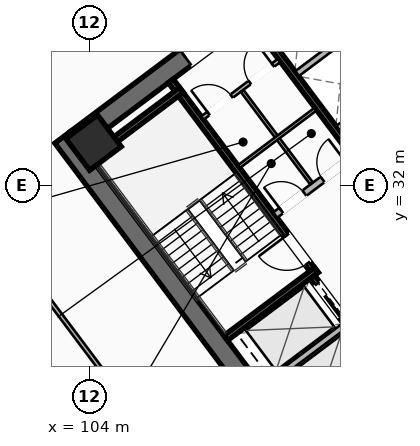
"""IFC4 building model, lengths in metres.
Left out: names, types, materials, properties, quantities, classifications, styles, units other than length and angle.
Written with IfcOpenShell. Run it as: python <this file> out.ifc"""

import sys

from ifc_helpers import new_model, si_unit, direction, frame, frame_2d, origin, origin_2d, place, context, subcontext, project, spatial, rectangle, hollow_rectangle, extrude, element, fill, save


model = new_model("IFC4")
c1 = context("Model", 3, precision=1e-05, world=origin(), true_north=direction((0.0, 1.0)))
c2 = subcontext(c1, "Body", "Model", "MODEL_VIEW")
j1 = project(units=[si_unit("LENGTHUNIT", "METRE"), si_unit("PLANEANGLEUNIT", "RADIAN")], contexts=[c1])
p1 = place(None, origin())
s1 = spatial("IfcSite", under=j1, at=p1, CompositionType="ELEMENT")
p2 = place(p1, origin())
s2 = spatial("IfcBuilding", under=s1, at=p2, CompositionType="ELEMENT")
p3 = place(p2, frame((0.0, 0.0, 60.1)))
s3 = spatial("IfcBuildingStorey", under=s2, at=p3, CompositionType="ELEMENT", Elevation=60.1)
p4 = place(p3, frame((112.476, 21.107, 0.0), z_axis=(0.0, 0.0, 1.0), x_axis=(-0.600005007985, 0.799996243986, 0.0)))
e1 = element("IfcWall", 1, at=p4, inside=s3, PredefinedType="SHEAR", context=c2, shape_type="SweptSolid", body=[
    extrude(rectangle(XDim=15.6, YDim=0.65, at=frame_2d((7.8, 0.0))), origin(), (0.0, 0.0, 1.0), 3.55),
])
p5 = place(p3, frame((103.571, 33.522, 0.0), z_axis=(0.0, 0.0, 1.0), x_axis=(0.799998028465, 0.600002628705, 0.0)))
e2 = element("IfcWall", 2, at=p5, inside=s3, PredefinedType="SHEAR", context=c2, shape_type="SweptSolid", body=[
    extrude(rectangle(XDim=14.86, YDim=0.65, at=frame_2d((7.43, 0.0))), origin(), (0.0, 0.0, 1.0), 3.55),
])
p6 = place(p5, frame((4.48, 0.0, 0.0)))
e3 = element("IfcOpeningElement", 3, at=p6, cuts=e2, PredefinedType="OPENING", context=c2, shape_type="SweptSolid", body=[
    extrude(rectangle(XDim=1.25, YDim=2.25, at=frame_2d((0.625, 1.125))), frame((0.0, 0.335, 0.0), z_axis=(0.0, -1.0, 0.0), x_axis=(1.0, 0.0, 0.0)), (0.0, 0.0, 1.0), 0.67),
])
p7 = place(p5, frame((9.53, 0.0, 0.0)))
e4 = element("IfcOpeningElement", 4, at=p7, cuts=e2, PredefinedType="OPENING", context=c2, shape_type="SweptSolid", body=[
    extrude(rectangle(XDim=1.25, YDim=2.25, at=frame_2d((0.625, 1.125))), frame((0.0, 0.335, 0.0), z_axis=(0.0, -1.0, 0.0), x_axis=(1.0, 0.0, 0.0)), (0.0, 0.0, 1.0), 0.67),
])
p8 = place(p3, frame((104.13, 33.41, 0.0), z_axis=(0.0, 0.0, 1.0), x_axis=(0.799999996291, 0.600000004945, 0.0)))
e5 = element("IfcColumn", 5, at=p8, inside=s3, PredefinedType="COLUMN", context=c2, shape_type="SweptSolid", body=[
    extrude(hollow_rectangle(XDim=1.3, YDim=1.3, WallThickness=0.05, at=origin_2d()), origin(), (0.0, 0.0, 1.0), 3.35),
])
p9 = place(p3, frame((111.44, 29.08, 0.0), z_axis=(0.0, 0.0, 1.0), x_axis=(-0.600009827119, 0.799992629566, 0.0)))
e6 = element("IfcWall", 6, at=p9, inside=s3, PredefinedType="SHEAR", context=c2, shape_type="SweptSolid", body=[
    extrude(rectangle(XDim=7.95, YDim=0.2, at=frame_2d((3.975, 0.0))), origin(), (0.0, 0.0, 1.0), 3.35),
])
p10 = place(p9, frame((0.45, 0.0, 0.0)))
e7 = element("IfcOpeningElement", 7, at=p10, cuts=e6, PredefinedType="OPENING", context=c2, shape_type="SweptSolid", body=[
    extrude(rectangle(XDim=1.15, YDim=2.2, at=frame_2d((0.575, 1.1))), frame((0.0, 0.11, 0.0), z_axis=(0.0, -1.0, 0.0), x_axis=(1.0, 0.0, 0.0)), (0.0, 0.0, 1.0), 0.22),
])
for number, where, z_axis, x_axis in (
    (8, (108.476, 26.982, 0.0), (0.0, 0.0, 1.0), (0.8, 0.6, 0.0)),
    (9, (104.036, 32.902, 0.0), (0.0, 0.0, 1.0), (0.8, 0.6, 0.0)),
):
    element("IfcWall", number, at=place(p3, frame(where, z_axis=z_axis, x_axis=x_axis)), inside=s3, PredefinedType="SHEAR", context=c2, shape_type="SweptSolid", body=[
        extrude(rectangle(XDim=3.73, YDim=0.2, at=frame_2d((1.865, 0.0))), origin(), (0.0, 0.0, 1.0), 3.35),
    ])
p11 = place(p3, frame((117.938, 26.016, 0.0), z_axis=(0.0, 0.0, 1.0), x_axis=(-0.600005463273, 0.799995902516, 0.0)))
e10 = element("IfcWall", 10, at=p11, inside=s3, PredefinedType="SHEAR", context=c2, shape_type="SweptSolid", body=[
    extrude(rectangle(XDim=14.3, YDim=0.2, at=frame_2d((7.15, 0.0))), origin(), (0.0, 0.0, 1.0), 3.35),
])
p12 = place(p3, frame((110.104, 31.028, 0.0), z_axis=(0.0, 0.0, 1.0), x_axis=(0.800018601094, 0.59997519774, 0.0)))
e11 = element("IfcWall", 11, at=p12, inside=s3, PredefinedType="SOLIDWALL", context=c2, shape_type="SweptSolid", body=[
    extrude(rectangle(XDim=3.15, YDim=0.22, at=frame_2d((1.575, 0.0))), origin(), (0.0, 0.0, 1.0), 2.703),
])
p13 = place(p12, frame((0.25, 0.0, 0.0)))
e12 = element("IfcOpeningElement", 12, at=p13, cuts=e11, PredefinedType="OPENING", context=c2, shape_type="SweptSolid", body=[
    extrude(rectangle(XDim=0.95, YDim=2.05, at=frame_2d((0.475, 1.025))), frame((0.0, 0.12, 0.0), z_axis=(0.0, -1.0, 0.0), x_axis=(1.0, 0.0, 0.0)), (0.0, 0.0, 1.0), 0.24),
])
p14 = place(p12, frame((1.95, 0.0, 0.0)))
e13 = element("IfcOpeningElement", 13, at=p14, cuts=e11, PredefinedType="OPENING", context=c2, shape_type="SweptSolid", body=[
    extrude(rectangle(XDim=0.95, YDim=2.05, at=frame_2d((0.475, 1.025))), frame((0.0, 0.12, 0.0), z_axis=(0.0, -1.0, 0.0), x_axis=(1.0, 0.0, 0.0)), (0.0, 0.0, 1.0), 0.24),
])
p15 = place(p3, frame((115.13, 23.91, 0.0), z_axis=(0.0, 0.0, 1.0), x_axis=(-0.599975393228, 0.800018454488, 0.0)))
e14 = element("IfcWall", 14, at=p15, inside=s3, PredefinedType="SHEAR", context=c2, shape_type="SweptSolid", body=[
    extrude(rectangle(XDim=6.35, YDim=0.2, at=frame_2d((3.175, 0.0))), origin(), (0.0, 0.0, 1.0), 3.35),
])
p16 = place(p15, frame((4.775, 0.0, 0.0)))
e15 = element("IfcOpeningElement", 15, at=p16, cuts=e14, PredefinedType="OPENING", context=c2, shape_type="SweptSolid", body=[
    extrude(rectangle(XDim=1.3, YDim=2.25, at=frame_2d((0.65, 1.125))), frame((0.0, 0.11, 0.0), z_axis=(0.0, -1.0, 0.0), x_axis=(1.0, 0.0, 0.0)), (0.0, 0.0, 1.0), 0.22),
])
p17 = place(p15, frame((2.775, 0.0, 0.0)))
e16 = element("IfcOpeningElement", 16, at=p17, cuts=e14, PredefinedType="OPENING", context=c2, shape_type="SweptSolid", body=[
    extrude(rectangle(XDim=1.3, YDim=2.25, at=frame_2d((0.65, 1.125))), frame((0.0, 0.11, 0.0), z_axis=(0.0, -1.0, 0.0), x_axis=(1.0, 0.0, 0.0)), (0.0, 0.0, 1.0), 0.22),
])
p18 = place(p15, frame((0.575, 0.0, 0.0)))
e17 = element("IfcOpeningElement", 17, at=p18, cuts=e14, PredefinedType="OPENING", context=c2, shape_type="SweptSolid", body=[
    extrude(rectangle(XDim=1.3, YDim=2.25, at=frame_2d((0.65, 1.125))), frame((0.0, 0.11, 0.0), z_axis=(0.0, -1.0, 0.0), x_axis=(1.0, 0.0, 0.0)), (0.0, 0.0, 1.0), 0.22),
])
p19 = place(p3, frame((109.688, 25.366, 0.0), z_axis=(0.0, 0.0, 1.0), x_axis=(0.8, 0.6, 0.0)))
e18 = element("IfcWall", 18, at=p19, inside=s3, PredefinedType="SOLIDWALL", context=c2, shape_type="SweptSolid", body=[
    extrude(rectangle(XDim=3.38, YDim=0.2, at=frame_2d((1.69, 0.0))), origin(), (0.0, 0.0, 1.0), 3.35),
])
p20 = place(p3, frame((107.71, 34.22, 0.0), z_axis=(0.0, 0.0, 1.0), x_axis=(0.799981399002, 0.60002480053, 0.0)))
e19 = element("IfcWall", 19, at=p20, inside=s3, PredefinedType="PARTITIONING", context=c2, shape_type="SweptSolid", body=[
    extrude(rectangle(XDim=3.15, YDim=0.135, at=frame_2d((1.575, 0.0))), origin(), (0.0, 0.0, 1.0), 2.703),
])
p21 = place(p20, frame((0.25, 0.0, 0.0)))
e20 = element("IfcOpeningElement", 20, at=p21, cuts=e19, PredefinedType="OPENING", context=c2, shape_type="SweptSolid", body=[
    extrude(rectangle(XDim=0.95, YDim=2.05, at=frame_2d((0.475, 1.025))), frame((0.0, 0.077, 0.0), z_axis=(0.0, -1.0, 0.0), x_axis=(1.0, 0.0, 0.0)), (0.0, 0.0, 1.0), 0.155),
])
p22 = place(p20, frame((1.95, 0.0, 0.0)))
e21 = element("IfcOpeningElement", 21, at=p22, cuts=e19, PredefinedType="OPENING", context=c2, shape_type="SweptSolid", body=[
    extrude(rectangle(XDim=0.95, YDim=2.05, at=frame_2d((0.475, 1.025))), frame((0.0, 0.077, 0.0), z_axis=(0.0, -1.0, 0.0), x_axis=(1.0, 0.0, 0.0)), (0.0, 0.0, 1.0), 0.155),
])
p23 = place(p3, frame((111.296, 32.072, 0.0), z_axis=(0.0, 0.0, 1.0), x_axis=(-0.59995887973, 0.800030838552, 0.0)))
e22 = element("IfcWall", 22, at=p23, inside=s3, PredefinedType="PARTITIONING", context=c2, shape_type="SweptSolid", body=[
    extrude(rectangle(XDim=3.8, YDim=0.11, at=frame_2d((1.9, 0.0))), origin(), (0.0, 0.0, 1.0), 2.703),
])
p24 = place(p3, frame((108.91, 32.62, 0.0), z_axis=(0.0, 0.0, 1.0), x_axis=(0.800018601094, 0.59997519774, 0.0)))
e23 = element("IfcWall", 23, at=p24, inside=s3, PredefinedType="PARTITIONING", context=c2, shape_type="SweptSolid", body=[
    extrude(rectangle(XDim=3.15, YDim=0.11, at=frame_2d((1.575, 0.0))), origin(), (0.0, 0.0, 1.0), 2.703),
])
p25 = place(p3, frame((115.11, 33.27, 0.0), z_axis=(0.0, 0.0, 1.0), x_axis=(-0.600011488909, 0.79999138319, 0.0)))
e24 = element("IfcWall", 24, at=p25, inside=s3, PredefinedType="SOLIDWALL", context=c2, shape_type="SweptSolid", body=[
    extrude(rectangle(XDim=6.8, YDim=0.2, at=frame_2d((3.4, 0.0))), origin(), (0.0, 0.0, 1.0), 3.35),
])
p26 = place(p3, frame((112.176, 33.882, 0.0), z_axis=(0.0, 0.0, 1.0), x_axis=(0.8, 0.6, 0.0)))
e25 = element("IfcWall", 25, at=p26, inside=s3, PredefinedType="SOLIDWALL", context=c2, shape_type="SweptSolid", body=[
    extrude(rectangle(XDim=1.88, YDim=0.2, at=frame_2d((0.94, 0.0))), origin(), (0.0, 0.0, 1.0), 3.35),
])
p27 = place(p3, frame((110.826, 35.682, 0.0), z_axis=(0.0, 0.0, 1.0), x_axis=(0.799984418148, 0.600020775241, 0.0)))
e26 = element("IfcWall", 26, at=p27, inside=s3, PredefinedType="SOLIDWALL", context=c2, shape_type="SweptSolid", body=[
    extrude(rectangle(XDim=1.88, YDim=0.2, at=frame_2d((0.94, 0.0))), origin(), (0.0, 0.0, 1.0), 3.35),
])
p28 = place(p3, frame((98.396, 33.922, 0.0), z_axis=(0.0, 0.0, 1.0), x_axis=(0.800001954438, 0.599997394074, 0.0)))
e27 = element("IfcWall", 27, at=p28, inside=s3, PredefinedType="PARTITIONING", context=c2, shape_type="SweptSolid", body=[
    extrude(rectangle(XDim=29.98, YDim=0.135, at=frame_2d((14.99, 0.0))), origin(), (0.0, 0.0, 1.0), 2.703),
])
p29 = place(p28, frame((0.3, 0.0, 0.0)))
e28 = element("IfcOpeningElement", 28, at=p29, cuts=e27, PredefinedType="OPENING", context=c2, shape_type="SweptSolid", body=[
    extrude(rectangle(XDim=0.95, YDim=2.05, at=frame_2d((0.475, 1.025))), frame((0.0, 0.077, 0.0), z_axis=(0.0, -1.0, 0.0), x_axis=(1.0, 0.0, 0.0)), (0.0, 0.0, 1.0), 0.155),
])
p30 = place(p28, frame((11.143, 0.0, 0.0)))
e29 = element("IfcOpeningElement", 29, at=p30, cuts=e27, PredefinedType="OPENING", context=c2, shape_type="SweptSolid", body=[
    extrude(rectangle(XDim=0.95, YDim=2.05, at=frame_2d((0.475, 1.025))), frame((0.0, 0.077, 0.0), z_axis=(0.0, -1.0, 0.0), x_axis=(1.0, 0.0, 0.0)), (0.0, 0.0, 1.0), 0.155),
])
p31 = place(p28, frame((28.73, 0.0, 0.0)))
e30 = element("IfcOpeningElement", 30, at=p31, cuts=e27, PredefinedType="OPENING", context=c2, shape_type="SweptSolid", body=[
    extrude(rectangle(XDim=0.95, YDim=2.05, at=frame_2d((0.475, 1.025))), frame((0.0, 0.077, 0.0), z_axis=(0.0, -1.0, 0.0), x_axis=(1.0, 0.0, 0.0)), (0.0, 0.0, 1.0), 0.155),
])
p32 = place(p3, frame((135.46, 34.47, 0.0), z_axis=(0.0, 0.0, 1.0), x_axis=(-0.799998045563, -0.600002605907, 0.0)))
e31 = element("IfcWall", 31, at=p32, inside=s3, PredefinedType="PARTITIONING", context=c2, shape_type="SweptSolid", body=[
    extrude(rectangle(XDim=29.98, YDim=0.135, at=frame_2d((14.99, 0.0))), origin(), (0.0, 0.0, 1.0), 2.703),
])
p33 = place(p32, frame((28.65, 0.0, 0.0)))
e32 = element("IfcOpeningElement", 32, at=p33, cuts=e31, PredefinedType="OPENING", context=c2, shape_type="SweptSolid", body=[
    extrude(rectangle(XDim=0.95, YDim=2.05, at=frame_2d((0.475, 1.025))), frame((0.0, 0.077, 0.0), z_axis=(0.0, -1.0, 0.0), x_axis=(1.0, 0.0, 0.0)), (0.0, 0.0, 1.0), 0.155),
])
p34 = place(p32, frame((17.938, 0.0, 0.0)))
e33 = element("IfcOpeningElement", 33, at=p34, cuts=e31, PredefinedType="OPENING", context=c2, shape_type="SweptSolid", body=[
    extrude(rectangle(XDim=0.95, YDim=2.05, at=frame_2d((0.475, 1.025))), frame((0.0, 0.077, 0.0), z_axis=(0.0, -1.0, 0.0), x_axis=(1.0, 0.0, 0.0)), (0.0, 0.0, 1.0), 0.155),
])
p35 = place(p32, frame((0.38, 0.0, 0.0)))
e34 = element("IfcOpeningElement", 34, at=p35, cuts=e31, PredefinedType="OPENING", context=c2, shape_type="SweptSolid", body=[
    extrude(rectangle(XDim=0.95, YDim=2.05, at=frame_2d((0.475, 1.025))), frame((0.0, 0.077, 0.0), z_axis=(0.0, -1.0, 0.0), x_axis=(1.0, 0.0, 0.0)), (0.0, 0.0, 1.0), 0.155),
])
p36 = place(p3, frame((111.428, 16.546, 0.0), z_axis=(0.0, 0.0, 1.0), x_axis=(-0.599996389772, 0.800002707659, 0.0)))
e35 = element("IfcWall", 35, at=p36, inside=s3, PredefinedType="PARTITIONING", context=c2, shape_type="SweptSolid", body=[
    extrude(rectangle(XDim=21.64, YDim=0.135, at=frame_2d((10.82, 0.0))), origin(), (0.0, 0.0, 1.0), 2.703),
])
p37 = place(p36, frame((0.3, 0.0, 0.0)))
e36 = element("IfcOpeningElement", 36, at=p37, cuts=e35, PredefinedType="OPENING", context=c2, shape_type="SweptSolid", body=[
    extrude(rectangle(XDim=0.95, YDim=2.05, at=frame_2d((0.475, 1.025))), frame((0.0, 0.077, 0.0), z_axis=(0.0, -1.0, 0.0), x_axis=(1.0, 0.0, 0.0)), (0.0, 0.0, 1.0), 0.155),
])
p38 = place(p6, origin())
e37 = element("IfcDoor", 37, at=p38, inside=s3, OperationType="SINGLE_SWING_LEFT", PredefinedType="DOOR", context=c2, shape_type="SweptSolid", body=[
    extrude(rectangle(XDim=1.25, YDim=2.25, at=frame_2d((0.625, 1.125))), frame((0.0, 0.025, 0.0), z_axis=(0.0, -1.0, 0.0), x_axis=(1.0, 0.0, 0.0)), (0.0, 0.0, 1.0), 0.05),
])
fill(e3, e37)
p39 = place(p10, origin())
e38 = element("IfcDoor", 38, at=p39, inside=s3, OperationType="SINGLE_SWING_RIGHT", PredefinedType="DOOR", context=c2, shape_type="SweptSolid", body=[
    extrude(rectangle(XDim=1.15, YDim=2.2, at=frame_2d((0.575, 1.1))), frame((0.0, 0.025, 0.0), z_axis=(0.0, -1.0, 0.0), x_axis=(1.0, 0.0, 0.0)), (0.0, 0.0, 1.0), 0.05),
])
fill(e7, e38)
p40 = place(p21, origin())
e39 = element("IfcDoor", 39, at=p40, inside=s3, OperationType="SINGLE_SWING_LEFT", PredefinedType="DOOR", context=c2, shape_type="SweptSolid", body=[
    extrude(rectangle(XDim=0.95, YDim=2.05, at=frame_2d((0.475, 1.025))), frame((0.0, 0.025, 0.0), z_axis=(0.0, -1.0, 0.0), x_axis=(1.0, 0.0, 0.0)), (0.0, 0.0, 1.0), 0.05),
])
fill(e20, e39)
p41 = place(p22, origin())
e40 = element("IfcDoor", 40, at=p41, inside=s3, OperationType="SINGLE_SWING_RIGHT", PredefinedType="DOOR", context=c2, shape_type="SweptSolid", body=[
    extrude(rectangle(XDim=0.95, YDim=2.05, at=frame_2d((0.475, 1.025))), frame((0.0, 0.025, 0.0), z_axis=(0.0, -1.0, 0.0), x_axis=(1.0, 0.0, 0.0)), (0.0, 0.0, 1.0), 0.05),
])
fill(e21, e40)
p42 = place(p13, origin())
e41 = element("IfcDoor", 41, at=p42, inside=s3, OperationType="SINGLE_SWING_LEFT", PredefinedType="DOOR", context=c2, shape_type="SweptSolid", body=[
    extrude(rectangle(XDim=0.95, YDim=2.05, at=frame_2d((0.475, 1.025))), frame((0.0, 0.025, 0.0), z_axis=(0.0, -1.0, 0.0), x_axis=(1.0, 0.0, 0.0)), (0.0, 0.0, 1.0), 0.05),
])
fill(e12, e41)
p43 = place(p14, origin())
e42 = element("IfcDoor", 42, at=p43, inside=s3, OperationType="SINGLE_SWING_RIGHT", PredefinedType="DOOR", context=c2, shape_type="SweptSolid", body=[
    extrude(rectangle(XDim=0.95, YDim=2.05, at=frame_2d((0.475, 1.025))), frame((0.0, 0.025, 0.0), z_axis=(0.0, -1.0, 0.0), x_axis=(1.0, 0.0, 0.0)), (0.0, 0.0, 1.0), 0.05),
])
fill(e13, e42)
p44 = place(p16, origin())
e43 = element("IfcDoor", 43, at=p44, inside=s3, OperationType="SLIDING_TO_LEFT", PredefinedType="DOOR", context=c2, shape_type="SweptSolid", body=[
    extrude(rectangle(XDim=1.3, YDim=2.25, at=frame_2d((0.65, 1.125))), frame((0.0, 0.025, 0.0), z_axis=(0.0, -1.0, 0.0), x_axis=(1.0, 0.0, 0.0)), (0.0, 0.0, 1.0), 0.05),
])
fill(e15, e43)
save(model, sys.argv[1])
